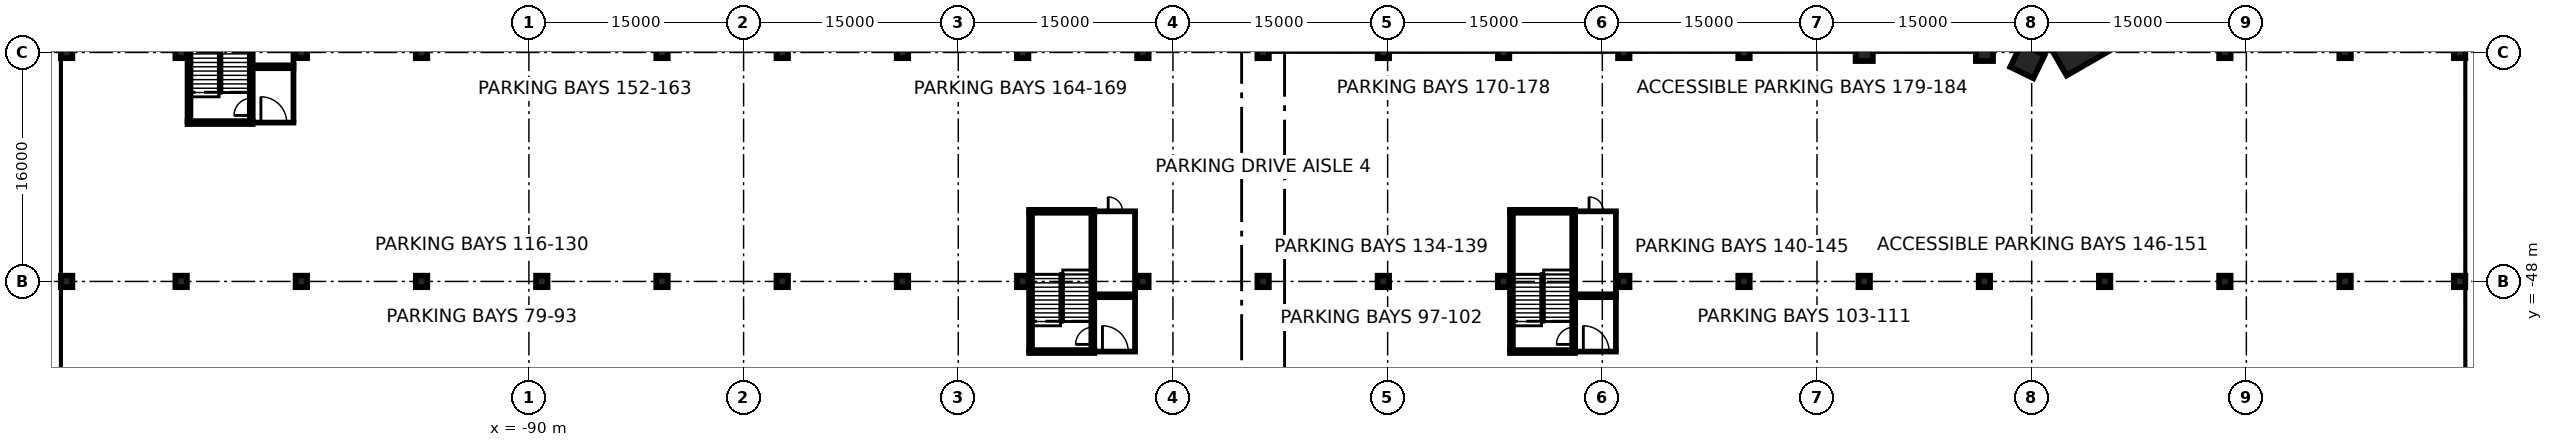
"""IFC4 building model, lengths in metres.
Left out: names, types, materials, properties, quantities, classifications, styles, units other than length and angle.
Written with IfcOpenShell. Run it as: python <this file> out.ifc"""

import sys

from ifc_helpers import new_model, si_unit, direction, frame, frame_2d, origin, origin_2d, place, context, subcontext, project, spatial, rectangle, extrude, element, fill, save


model = new_model("IFC4")
c1 = context("Model", 3, precision=1e-05, world=origin(), true_north=direction((0.0, 1.0)))
c2 = subcontext(c1, "Body", "Model", "MODEL_VIEW")
j1 = project(units=[si_unit("LENGTHUNIT", "METRE"), si_unit("PLANEANGLEUNIT", "RADIAN")], contexts=[c1])
p1 = place(None, origin())
s1 = spatial("IfcSite", under=j1, at=p1, CompositionType="ELEMENT")
p2 = place(p1, origin())
s2 = spatial("IfcBuilding", under=s1, at=p2, CompositionType="ELEMENT")
p3 = place(p2, frame((0.0, 0.0, -12.0)))
s3 = spatial("IfcBuildingStorey", under=s2, at=p3, CompositionType="ELEMENT", Elevation=-12.0)
for number, where, z_axis, x_axis in (
    (1, (-123.15, -80.0, 0.0), (0.0, 0.0, 1.0), (0.0, 1.0, 0.0)),
    (2, (45.75, -80.0, 0.0), (0.0, 0.0, 1.0), (0.0, 1.0, 0.0)),
):
    element("IfcWall", number, at=place(p3, frame(where, z_axis=z_axis, x_axis=x_axis)), inside=s3, PredefinedType="USERDEFINED", context=c2, shape_type="SweptSolid", body=[
        extrude(rectangle(XDim=160.0, YDim=0.9, at=frame_2d((80.0, 0.0))), origin(), (0.0, 0.0, 1.0), 11.55),
    ])
p4 = place(p2, frame((0.0, 0.0, -3.6)))
s4 = spatial("IfcBuildingStorey", under=s2, at=p4, CompositionType="ELEMENT", Elevation=-3.6)
p5 = place(p4, frame((17.865, -30.942, -0.4), z_axis=(0.0, 0.0, 1.0), x_axis=(-0.5, 0.866025403784, 0.0)))
e3 = element("IfcColumn", 3, at=p5, inside=s4, PredefinedType="COLUMN", context=c2, shape_type="SweptSolid", body=[
    extrude(rectangle(XDim=4.2, YDim=3.4, at=origin_2d()), origin(), (0.0, 0.0, 1.0), 3.55),
])
p6 = place(p4, frame((14.705, -32.599, -0.4), z_axis=(0.0, 0.0, 1.0), x_axis=(0.438341341409, 0.898808582743, 0.0)))
e4 = element("IfcColumn", 4, at=p6, inside=s4, PredefinedType="COLUMN", context=c2, shape_type="SweptSolid", body=[
    extrude(rectangle(XDim=1.8, YDim=1.8, at=origin_2d()), origin(), (0.0, 0.0, 1.0), 3.55),
])
for number, where, z_axis, x_axis in (
    (5, (-122.3, -48.0, -0.4), (0.0, 0.0, 1.0), (1.0, 0.0, 0.0)),
    (6, (-122.3, -32.0, -0.4), (0.0, 0.0, 1.0), (1.0, 0.0, 0.0)),
    (7, (-114.3, -48.0, -0.4), (0.0, 0.0, 1.0), (1.0, 0.0, 0.0)),
    (8, (-114.3, -32.0, -0.4), (0.0, 0.0, 1.0), (1.0, 0.0, 0.0)),
    (9, (-105.9, -48.0, -0.4), (0.0, 0.0, 1.0), (1.0, 0.0, 0.0)),
    (10, (-105.9, -32.0, -0.4), (0.0, 0.0, 1.0), (1.0, 0.0, 0.0)),
    (11, (-97.5, -48.0, -0.4), (0.0, 0.0, 1.0), (1.0, 0.0, 0.0)),
    (12, (-97.5, -32.0, -0.4), (0.0, 0.0, 1.0), (1.0, 0.0, 0.0)),
    (13, (-89.1, -48.0, -0.4), (0.0, 0.0, 1.0), (1.0, 0.0, 0.0)),
    (14, (-80.7, -48.0, -0.4), (0.0, 0.0, 1.0), (1.0, 0.0, 0.0)),
    (15, (-80.7, -32.0, -0.4), (0.0, 0.0, 1.0), (1.0, 0.0, 0.0)),
    (16, (-72.3, -48.0, -0.4), (0.0, 0.0, 1.0), (1.0, 0.0, 0.0)),
    (17, (-72.3, -32.0, -0.4), (0.0, 0.0, 1.0), (1.0, 0.0, 0.0)),
    (18, (-63.9, -48.0, -0.4), (0.0, 0.0, 1.0), (1.0, 0.0, 0.0)),
    (19, (-63.9, -32.0, -0.4), (0.0, 0.0, 1.0), (1.0, 0.0, 0.0)),
    (20, (-55.5, -48.0, -0.4), (0.0, 0.0, 1.0), (1.0, 0.0, 0.0)),
    (21, (-55.5, -32.0, -0.4), (0.0, 0.0, 1.0), (1.0, 0.0, 0.0)),
    (22, (-47.1, -48.0, -0.4), (0.0, 0.0, 1.0), (1.0, 0.0, 0.0)),
    (23, (-47.1, -32.0, -0.4), (0.0, 0.0, 1.0), (1.0, 0.0, 0.0)),
    (24, (-38.7, -48.0, -0.4), (0.0, 0.0, 1.0), (1.0, 0.0, 0.0)),
    (25, (-38.7, -32.0, -0.4), (0.0, 0.0, 1.0), (1.0, 0.0, 0.0)),
    (26, (-30.3, -48.0, -0.4), (0.0, 0.0, 1.0), (1.0, 0.0, 0.0)),
    (27, (-30.3, -32.0, -0.4), (0.0, 0.0, 1.0), (1.0, 0.0, 0.0)),
    (28, (-21.9, -48.0, -0.4), (0.0, 0.0, 1.0), (1.0, 0.0, 0.0)),
    (29, (-21.9, -32.0, -0.4), (0.0, 0.0, 1.0), (1.0, 0.0, 0.0)),
    (30, (-13.5, -48.0, -0.4), (0.0, 0.0, 1.0), (1.0, 0.0, 0.0)),
    (31, (-13.5, -32.0, -0.4), (0.0, 0.0, 1.0), (1.0, 0.0, 0.0)),
    (32, (-5.1, -48.0, -0.4), (0.0, 0.0, 1.0), (1.0, 0.0, 0.0)),
    (33, (-5.1, -32.0, -0.4), (0.0, 0.0, 1.0), (1.0, 0.0, 0.0)),
    (34, (3.3, -48.0, -0.4), (0.0, 0.0, 1.0), (1.0, 0.0, 0.0)),
):
    element("IfcColumn", number, at=place(p4, frame(where, z_axis=z_axis, x_axis=x_axis)), inside=s4, PredefinedType="COLUMN", context=c2, shape_type="SweptSolid", body=[
        extrude(rectangle(XDim=0.8, YDim=0.8, at=origin_2d()), origin(), (0.0, 0.0, 1.0), 3.55),
    ])
p7 = place(p4, frame((3.3, -32.0, -0.4), z_axis=(0.0, 0.0, 1.0), x_axis=(1.0, 0.0, 0.0)))
e35 = element("IfcColumn", 35, at=p7, inside=s4, PredefinedType="COLUMN", context=c2, shape_type="SweptSolid", body=[
    extrude(rectangle(XDim=1.2, YDim=1.2, at=origin_2d()), origin(), (0.0, 0.0, 1.0), 3.55),
])
p8 = place(p4, frame((11.7, -48.0, -0.4), z_axis=(0.0, 0.0, 1.0), x_axis=(1.0, 0.0, 0.0)))
e36 = element("IfcColumn", 36, at=p8, inside=s4, PredefinedType="COLUMN", context=c2, shape_type="SweptSolid", body=[
    extrude(rectangle(XDim=0.8, YDim=0.8, at=origin_2d()), origin(), (0.0, 0.0, 1.0), 3.55),
])
p9 = place(p4, frame((11.7, -32.0, -0.4), z_axis=(0.0, 0.0, 1.0), x_axis=(1.0, 0.0, 0.0)))
e37 = element("IfcColumn", 37, at=p9, inside=s4, PredefinedType="COLUMN", context=c2, shape_type="SweptSolid", body=[
    extrude(rectangle(XDim=1.2, YDim=1.2, at=origin_2d()), origin(), (0.0, 0.0, 1.0), 3.55),
])
for number, where, z_axis, x_axis in (
    (38, (20.1, -48.0, -0.4), (0.0, 0.0, 1.0), (1.0, 0.0, 0.0)),
    (39, (28.5, -48.0, -0.4), (0.0, 0.0, 1.0), (1.0, 0.0, 0.0)),
    (40, (28.5, -32.0, -0.4), (0.0, 0.0, 1.0), (1.0, 0.0, 0.0)),
    (41, (36.9, -48.0, -0.4), (0.0, 0.0, 1.0), (1.0, 0.0, 0.0)),
    (42, (36.9, -32.0, -0.4), (0.0, 0.0, 1.0), (1.0, 0.0, 0.0)),
    (43, (44.9, -48.0, -0.4), (0.0, 0.0, 1.0), (1.0, 0.0, 0.0)),
    (44, (44.9, -32.0, -0.4), (0.0, 0.0, 1.0), (1.0, 0.0, 0.0)),
):
    element("IfcColumn", number, at=place(p4, frame(where, z_axis=z_axis, x_axis=x_axis)), inside=s4, PredefinedType="COLUMN", context=c2, shape_type="SweptSolid", body=[
        extrude(rectangle(XDim=0.8, YDim=0.8, at=origin_2d()), origin(), (0.0, 0.0, 1.0), 3.55),
    ])
p10 = place(p4, frame((-109.3, -36.9, 0.0), z_axis=(0.0, 0.0, 1.0), x_axis=(1.0, 0.0, 0.0)))
e45 = element("IfcWall", 45, at=p10, inside=s4, PredefinedType="PARTITIONING", context=c2, shape_type="SweptSolid", body=[
    extrude(rectangle(XDim=2.95, YDim=0.2, at=frame_2d((1.475, 0.0))), origin(), (0.0, 0.0, 1.0), 3.15),
])
p11 = place(p10, frame((0.575, 0.0, 0.0)))
e46 = element("IfcOpeningElement", 46, at=p11, cuts=e45, PredefinedType="OPENING", context=c2, shape_type="SweptSolid", body=[
    extrude(rectangle(XDim=1.8, YDim=2.1, at=frame_2d((0.9, 1.05))), frame((0.0, 0.11, 0.0), z_axis=(0.0, -1.0, 0.0), x_axis=(1.0, 0.0, 0.0)), (0.0, 0.0, 1.0), 0.22),
])
p12 = place(p4, frame((-109.3, -33.1, 0.0), z_axis=(0.0, 0.0, 1.0), x_axis=(1.0, 0.0, 0.0)))
e47 = element("IfcWall", 47, at=p12, inside=s4, PredefinedType="PARTITIONING", context=c2, shape_type="SweptSolid", body=[
    extrude(rectangle(XDim=2.95, YDim=0.2, at=frame_2d((1.475, 0.0))), origin(), (0.0, 0.0, 1.0), 3.15),
])
p13 = place(p4, frame((-106.45, -36.8, 0.0), z_axis=(0.0, 0.0, 1.0), x_axis=(0.0, 1.0, 0.0)))
e48 = element("IfcWall", 48, at=p13, inside=s4, PredefinedType="PARTITIONING", context=c2, shape_type="SweptSolid", body=[
    extrude(rectangle(XDim=3.6, YDim=0.2, at=frame_2d((1.8, 0.0))), origin(), (0.0, 0.0, 1.0), 3.15),
])
p14 = place(p4, frame((-109.3, -32.9, 0.0), z_axis=(0.0, 0.0, 1.0), x_axis=(1.0, 0.0, 0.0)))
e49 = element("IfcWall", 49, at=p14, inside=s4, PredefinedType="PARTITIONING", context=c2, shape_type="SweptSolid", body=[
    extrude(rectangle(XDim=2.95, YDim=0.2, at=frame_2d((1.475, 0.0))), origin(), (0.0, 0.0, 1.0), 3.15),
])
p15 = place(p4, frame((-106.45, -32.8, 0.0), z_axis=(0.0, 0.0, 1.0), x_axis=(0.0, 1.0, 0.0)))
e50 = element("IfcWall", 50, at=p15, inside=s4, PredefinedType="PARTITIONING", context=c2, shape_type="SweptSolid", body=[
    extrude(rectangle(XDim=5.6, YDim=0.2, at=frame_2d((2.8, 0.0))), origin(), (0.0, 0.0, 1.0), 3.15),
])
p16 = place(p4, frame((-50.5, -52.9, 0.0), z_axis=(0.0, 0.0, 1.0), x_axis=(1.0, 0.0, 0.0)))
e51 = element("IfcWall", 51, at=p16, inside=s4, PredefinedType="PARTITIONING", context=c2, shape_type="SweptSolid", body=[
    extrude(rectangle(XDim=2.95, YDim=0.2, at=frame_2d((1.475, 0.0))), origin(), (0.0, 0.0, 1.0), 3.15),
])
p17 = place(p16, frame((0.575, 0.0, 0.0)))
e52 = element("IfcOpeningElement", 52, at=p17, cuts=e51, PredefinedType="OPENING", context=c2, shape_type="SweptSolid", body=[
    extrude(rectangle(XDim=1.8, YDim=2.1, at=frame_2d((0.9, 1.05))), frame((0.0, 0.11, 0.0), z_axis=(0.0, -1.0, 0.0), x_axis=(1.0, 0.0, 0.0)), (0.0, 0.0, 1.0), 0.22),
])
p18 = place(p4, frame((-50.5, -49.1, 0.0), z_axis=(0.0, 0.0, 1.0), x_axis=(1.0, 0.0, 0.0)))
e53 = element("IfcWall", 53, at=p18, inside=s4, PredefinedType="PARTITIONING", context=c2, shape_type="SweptSolid", body=[
    extrude(rectangle(XDim=2.95, YDim=0.2, at=frame_2d((1.475, 0.0))), origin(), (0.0, 0.0, 1.0), 3.15),
])
p19 = place(p4, frame((-47.65, -52.8, 0.0), z_axis=(0.0, 0.0, 1.0), x_axis=(0.0, 1.0, 0.0)))
e54 = element("IfcWall", 54, at=p19, inside=s4, PredefinedType="PARTITIONING", context=c2, shape_type="SweptSolid", body=[
    extrude(rectangle(XDim=3.6, YDim=0.2, at=frame_2d((1.8, 0.0))), origin(), (0.0, 0.0, 1.0), 3.15),
])
p20 = place(p4, frame((-50.5, -48.9, 0.0), z_axis=(0.0, 0.0, 1.0), x_axis=(1.0, 0.0, 0.0)))
e55 = element("IfcWall", 55, at=p20, inside=s4, PredefinedType="PARTITIONING", context=c2, shape_type="SweptSolid", body=[
    extrude(rectangle(XDim=2.95, YDim=0.2, at=frame_2d((1.475, 0.0))), origin(), (0.0, 0.0, 1.0), 3.15),
])
p21 = place(p4, frame((-50.5, -43.1, 0.0), z_axis=(0.0, 0.0, 1.0), x_axis=(1.0, 0.0, 0.0)))
e56 = element("IfcWall", 56, at=p21, inside=s4, PredefinedType="PARTITIONING", context=c2, shape_type="SweptSolid", body=[
    extrude(rectangle(XDim=2.95, YDim=0.2, at=frame_2d((1.475, 0.0))), origin(), (0.0, 0.0, 1.0), 3.15),
])
p22 = place(p21, frame((0.975, 0.0, 0.0)))
e57 = element("IfcOpeningElement", 57, at=p22, cuts=e56, PredefinedType="OPENING", context=c2, shape_type="SweptSolid", body=[
    extrude(rectangle(XDim=1.0, YDim=2.1, at=frame_2d((0.5, 1.05))), frame((0.0, 0.11, 0.0), z_axis=(0.0, -1.0, 0.0), x_axis=(1.0, 0.0, 0.0)), (0.0, 0.0, 1.0), 0.22),
])
p23 = place(p4, frame((-47.65, -48.8, 0.0), z_axis=(0.0, 0.0, 1.0), x_axis=(0.0, 1.0, 0.0)))
e58 = element("IfcWall", 58, at=p23, inside=s4, PredefinedType="PARTITIONING", context=c2, shape_type="SweptSolid", body=[
    extrude(rectangle(XDim=5.6, YDim=0.2, at=frame_2d((2.8, 0.0))), origin(), (0.0, 0.0, 1.0), 3.15),
])
p24 = place(p4, frame((-16.9, -52.9, 0.0), z_axis=(0.0, 0.0, 1.0), x_axis=(1.0, 0.0, 0.0)))
e59 = element("IfcWall", 59, at=p24, inside=s4, PredefinedType="PARTITIONING", context=c2, shape_type="SweptSolid", body=[
    extrude(rectangle(XDim=2.95, YDim=0.2, at=frame_2d((1.475, 0.0))), origin(), (0.0, 0.0, 1.0), 3.15),
])
p25 = place(p24, frame((0.575, 0.0, 0.0)))
e60 = element("IfcOpeningElement", 60, at=p25, cuts=e59, PredefinedType="OPENING", context=c2, shape_type="SweptSolid", body=[
    extrude(rectangle(XDim=1.8, YDim=2.1, at=frame_2d((0.9, 1.05))), frame((0.0, 0.11, 0.0), z_axis=(0.0, -1.0, 0.0), x_axis=(1.0, 0.0, 0.0)), (0.0, 0.0, 1.0), 0.22),
])
p26 = place(p4, frame((-16.9, -49.1, 0.0), z_axis=(0.0, 0.0, 1.0), x_axis=(1.0, 0.0, 0.0)))
e61 = element("IfcWall", 61, at=p26, inside=s4, PredefinedType="PARTITIONING", context=c2, shape_type="SweptSolid", body=[
    extrude(rectangle(XDim=2.95, YDim=0.2, at=frame_2d((1.475, 0.0))), origin(), (0.0, 0.0, 1.0), 3.15),
])
p27 = place(p4, frame((-14.05, -52.8, 0.0), z_axis=(0.0, 0.0, 1.0), x_axis=(0.0, 1.0, 0.0)))
e62 = element("IfcWall", 62, at=p27, inside=s4, PredefinedType="PARTITIONING", context=c2, shape_type="SweptSolid", body=[
    extrude(rectangle(XDim=3.6, YDim=0.2, at=frame_2d((1.8, 0.0))), origin(), (0.0, 0.0, 1.0), 3.15),
])
p28 = place(p4, frame((-16.9, -48.9, 0.0), z_axis=(0.0, 0.0, 1.0), x_axis=(1.0, 0.0, 0.0)))
e63 = element("IfcWall", 63, at=p28, inside=s4, PredefinedType="PARTITIONING", context=c2, shape_type="SweptSolid", body=[
    extrude(rectangle(XDim=2.95, YDim=0.2, at=frame_2d((1.475, 0.0))), origin(), (0.0, 0.0, 1.0), 3.15),
])
p29 = place(p4, frame((-16.9, -43.1, 0.0), z_axis=(0.0, 0.0, 1.0), x_axis=(1.0, 0.0, 0.0)))
e64 = element("IfcWall", 64, at=p29, inside=s4, PredefinedType="PARTITIONING", context=c2, shape_type="SweptSolid", body=[
    extrude(rectangle(XDim=2.95, YDim=0.2, at=frame_2d((1.475, 0.0))), origin(), (0.0, 0.0, 1.0), 3.15),
])
p30 = place(p29, frame((0.975, 0.0, 0.0)))
e65 = element("IfcOpeningElement", 65, at=p30, cuts=e64, PredefinedType="OPENING", context=c2, shape_type="SweptSolid", body=[
    extrude(rectangle(XDim=1.0, YDim=2.1, at=frame_2d((0.5, 1.05))), frame((0.0, 0.11, 0.0), z_axis=(0.0, -1.0, 0.0), x_axis=(1.0, 0.0, 0.0)), (0.0, 0.0, 1.0), 0.22),
])
p31 = place(p4, frame((-14.05, -48.8, 0.0), z_axis=(0.0, 0.0, 1.0), x_axis=(0.0, 1.0, 0.0)))
e66 = element("IfcWall", 66, at=p31, inside=s4, PredefinedType="PARTITIONING", context=c2, shape_type="SweptSolid", body=[
    extrude(rectangle(XDim=5.6, YDim=0.2, at=frame_2d((2.8, 0.0))), origin(), (0.0, 0.0, 1.0), 3.15),
])
p32 = place(p4, frame((-113.75, -36.8, 0.0), z_axis=(0.0, 0.0, 1.0), x_axis=(0.0, 1.0, 0.0)))
e67 = element("IfcWall", 67, at=p32, inside=s4, PredefinedType="SOLIDWALL", context=c2, shape_type="SweptSolid", body=[
    extrude(rectangle(XDim=9.6, YDim=0.2, at=frame_2d((4.8, 0.0))), origin(), (0.0, 0.0, 1.0), 3.15),
])
p33 = place(p4, frame((-109.4, -36.8, 0.0), z_axis=(0.0, 0.0, 1.0), x_axis=(0.0, 1.0, 0.0)))
e68 = element("IfcWall", 68, at=p33, inside=s4, PredefinedType="SOLIDWALL", context=c2, shape_type="SweptSolid", body=[
    extrude(rectangle(XDim=9.6, YDim=0.2, at=frame_2d((4.8, 0.0))), origin(), (0.0, 0.0, 1.0), 3.15),
])
p34 = place(p33, frame((0.4, 0.0, 0.0)))
e69 = element("IfcOpeningElement", 69, at=p34, cuts=e68, PredefinedType="OPENING", context=c2, shape_type="SweptSolid", body=[
    extrude(rectangle(XDim=1.2, YDim=2.1, at=frame_2d((0.6, 1.05))), frame((0.0, 0.11, 0.0), z_axis=(0.0, -1.0, 0.0), x_axis=(1.0, 0.0, 0.0)), (0.0, 0.0, 1.0), 0.22),
])
p35 = place(p4, frame((-109.3, -36.9, 0.0), z_axis=(0.0, 0.0, 1.0), x_axis=(-1.0, 0.0, 0.0)))
e70 = element("IfcWall", 70, at=p35, inside=s4, PredefinedType="SOLIDWALL", context=c2, shape_type="SweptSolid", body=[
    extrude(rectangle(XDim=4.55, YDim=0.2, at=frame_2d((2.275, 0.0))), origin(), (0.0, 0.0, 1.0), 3.15),
])
p36 = place(p4, frame((-54.95, -52.8, 0.0), z_axis=(0.0, 0.0, 1.0), x_axis=(0.0, 1.0, 0.0)))
e71 = element("IfcWall", 71, at=p36, inside=s4, PredefinedType="SOLIDWALL", context=c2, shape_type="SweptSolid", body=[
    extrude(rectangle(XDim=9.6, YDim=0.2, at=frame_2d((4.8, 0.0))), origin(), (0.0, 0.0, 1.0), 3.15),
])
p37 = place(p4, frame((-50.6, -52.8, 0.0), z_axis=(0.0, 0.0, 1.0), x_axis=(0.0, 1.0, 0.0)))
e72 = element("IfcWall", 72, at=p37, inside=s4, PredefinedType="SOLIDWALL", context=c2, shape_type="SweptSolid", body=[
    extrude(rectangle(XDim=9.6, YDim=0.2, at=frame_2d((4.8, 0.0))), origin(), (0.0, 0.0, 1.0), 3.15),
])
p38 = place(p37, frame((0.4, 0.0, 0.0)))
e73 = element("IfcOpeningElement", 73, at=p38, cuts=e72, PredefinedType="OPENING", context=c2, shape_type="SweptSolid", body=[
    extrude(rectangle(XDim=1.2, YDim=2.1, at=frame_2d((0.6, 1.05))), frame((0.0, 0.11, 0.0), z_axis=(0.0, -1.0, 0.0), x_axis=(1.0, 0.0, 0.0)), (0.0, 0.0, 1.0), 0.22),
])
for number, where, z_axis, x_axis in (
    (74, (-50.5, -52.9, 0.0), (0.0, 0.0, 1.0), (-1.0, 0.0, 0.0)),
    (75, (-55.05, -43.1, 0.0), (0.0, 0.0, 1.0), (1.0, 0.0, 0.0)),
):
    element("IfcWall", number, at=place(p4, frame(where, z_axis=z_axis, x_axis=x_axis)), inside=s4, PredefinedType="SOLIDWALL", context=c2, shape_type="SweptSolid", body=[
        extrude(rectangle(XDim=4.55, YDim=0.2, at=frame_2d((2.275, 0.0))), origin(), (0.0, 0.0, 1.0), 3.15),
    ])
p39 = place(p4, frame((-21.35, -52.8, 0.0), z_axis=(0.0, 0.0, 1.0), x_axis=(0.0, 1.0, 0.0)))
e76 = element("IfcWall", 76, at=p39, inside=s4, PredefinedType="SOLIDWALL", context=c2, shape_type="SweptSolid", body=[
    extrude(rectangle(XDim=9.6, YDim=0.2, at=frame_2d((4.8, 0.0))), origin(), (0.0, 0.0, 1.0), 3.15),
])
p40 = place(p4, frame((-17.0, -52.8, 0.0), z_axis=(0.0, 0.0, 1.0), x_axis=(0.0, 1.0, 0.0)))
e77 = element("IfcWall", 77, at=p40, inside=s4, PredefinedType="SOLIDWALL", context=c2, shape_type="SweptSolid", body=[
    extrude(rectangle(XDim=9.6, YDim=0.2, at=frame_2d((4.8, 0.0))), origin(), (0.0, 0.0, 1.0), 3.15),
])
p41 = place(p40, frame((0.4, 0.0, 0.0)))
e78 = element("IfcOpeningElement", 78, at=p41, cuts=e77, PredefinedType="OPENING", context=c2, shape_type="SweptSolid", body=[
    extrude(rectangle(XDim=1.2, YDim=2.1, at=frame_2d((0.6, 1.05))), frame((0.0, 0.11, 0.0), z_axis=(0.0, -1.0, 0.0), x_axis=(1.0, 0.0, 0.0)), (0.0, 0.0, 1.0), 0.22),
])
for number, where, z_axis, x_axis in (
    (79, (-16.9, -52.9, 0.0), (0.0, 0.0, 1.0), (-1.0, 0.0, 0.0)),
    (80, (-21.45, -43.1, 0.0), (0.0, 0.0, 1.0), (1.0, 0.0, 0.0)),
):
    element("IfcWall", number, at=place(p4, frame(where, z_axis=z_axis, x_axis=x_axis)), inside=s4, PredefinedType="SOLIDWALL", context=c2, shape_type="SweptSolid", body=[
        extrude(rectangle(XDim=4.55, YDim=0.2, at=frame_2d((2.275, 0.0))), origin(), (0.0, 0.0, 1.0), 3.15),
    ])
p42 = place(p11, origin())
e81 = element("IfcDoor", 81, at=p42, inside=s4, OperationType="DOUBLE_DOOR_SINGLE_SWING", PredefinedType="DOOR", context=c2, shape_type="SweptSolid", body=[
    extrude(rectangle(XDim=1.8, YDim=2.1, at=frame_2d((0.9, 1.05))), frame((0.0, 0.025, 0.0), z_axis=(0.0, -1.0, 0.0), x_axis=(1.0, 0.0, 0.0)), (0.0, 0.0, 1.0), 0.05),
])
fill(e46, e81)
p43 = place(p17, origin())
e82 = element("IfcDoor", 82, at=p43, inside=s4, OperationType="DOUBLE_DOOR_SINGLE_SWING", PredefinedType="DOOR", context=c2, shape_type="SweptSolid", body=[
    extrude(rectangle(XDim=1.8, YDim=2.1, at=frame_2d((0.9, 1.05))), frame((0.0, 0.025, 0.0), z_axis=(0.0, -1.0, 0.0), x_axis=(1.0, 0.0, 0.0)), (0.0, 0.0, 1.0), 0.05),
])
fill(e52, e82)
p44 = place(p22, origin())
e83 = element("IfcDoor", 83, at=p44, inside=s4, OperationType="SINGLE_SWING_LEFT", PredefinedType="DOOR", context=c2, shape_type="SweptSolid", body=[
    extrude(rectangle(XDim=1.0, YDim=2.1, at=frame_2d((0.5, 1.05))), frame((0.0, 0.025, 0.0), z_axis=(0.0, -1.0, 0.0), x_axis=(1.0, 0.0, 0.0)), (0.0, 0.0, 1.0), 0.05),
])
fill(e57, e83)
p45 = place(p25, origin())
e84 = element("IfcDoor", 84, at=p45, inside=s4, OperationType="DOUBLE_DOOR_SINGLE_SWING", PredefinedType="DOOR", context=c2, shape_type="SweptSolid", body=[
    extrude(rectangle(XDim=1.8, YDim=2.1, at=frame_2d((0.9, 1.05))), frame((0.0, 0.025, 0.0), z_axis=(0.0, -1.0, 0.0), x_axis=(1.0, 0.0, 0.0)), (0.0, 0.0, 1.0), 0.05),
])
fill(e60, e84)
p46 = place(p30, origin())
e85 = element("IfcDoor", 85, at=p46, inside=s4, OperationType="SINGLE_SWING_LEFT", PredefinedType="DOOR", context=c2, shape_type="SweptSolid", body=[
    extrude(rectangle(XDim=1.0, YDim=2.1, at=frame_2d((0.5, 1.05))), frame((0.0, 0.025, 0.0), z_axis=(0.0, -1.0, 0.0), x_axis=(1.0, 0.0, 0.0)), (0.0, 0.0, 1.0), 0.05),
])
fill(e65, e85)
p47 = place(p34, origin())
e86 = element("IfcDoor", 86, at=p47, inside=s4, OperationType="SINGLE_SWING_LEFT", PredefinedType="DOOR", context=c2, shape_type="SweptSolid", body=[
    extrude(rectangle(XDim=1.2, YDim=2.1, at=frame_2d((0.6, 1.05))), frame((0.0, 0.025, 0.0), z_axis=(0.0, -1.0, 0.0), x_axis=(1.0, 0.0, 0.0)), (0.0, 0.0, 1.0), 0.05),
])
fill(e69, e86)
p48 = place(p38, origin())
e87 = element("IfcDoor", 87, at=p48, inside=s4, OperationType="SINGLE_SWING_LEFT", PredefinedType="DOOR", context=c2, shape_type="SweptSolid", body=[
    extrude(rectangle(XDim=1.2, YDim=2.1, at=frame_2d((0.6, 1.05))), frame((0.0, 0.025, 0.0), z_axis=(0.0, -1.0, 0.0), x_axis=(1.0, 0.0, 0.0)), (0.0, 0.0, 1.0), 0.05),
])
fill(e73, e87)
p49 = place(p41, origin())
e88 = element("IfcDoor", 88, at=p49, inside=s4, OperationType="SINGLE_SWING_LEFT", PredefinedType="DOOR", context=c2, shape_type="SweptSolid", body=[
    extrude(rectangle(XDim=1.2, YDim=2.1, at=frame_2d((0.6, 1.05))), frame((0.0, 0.025, 0.0), z_axis=(0.0, -1.0, 0.0), x_axis=(1.0, 0.0, 0.0)), (0.0, 0.0, 1.0), 0.05),
])
fill(e78, e88)
save(model, sys.argv[1])
